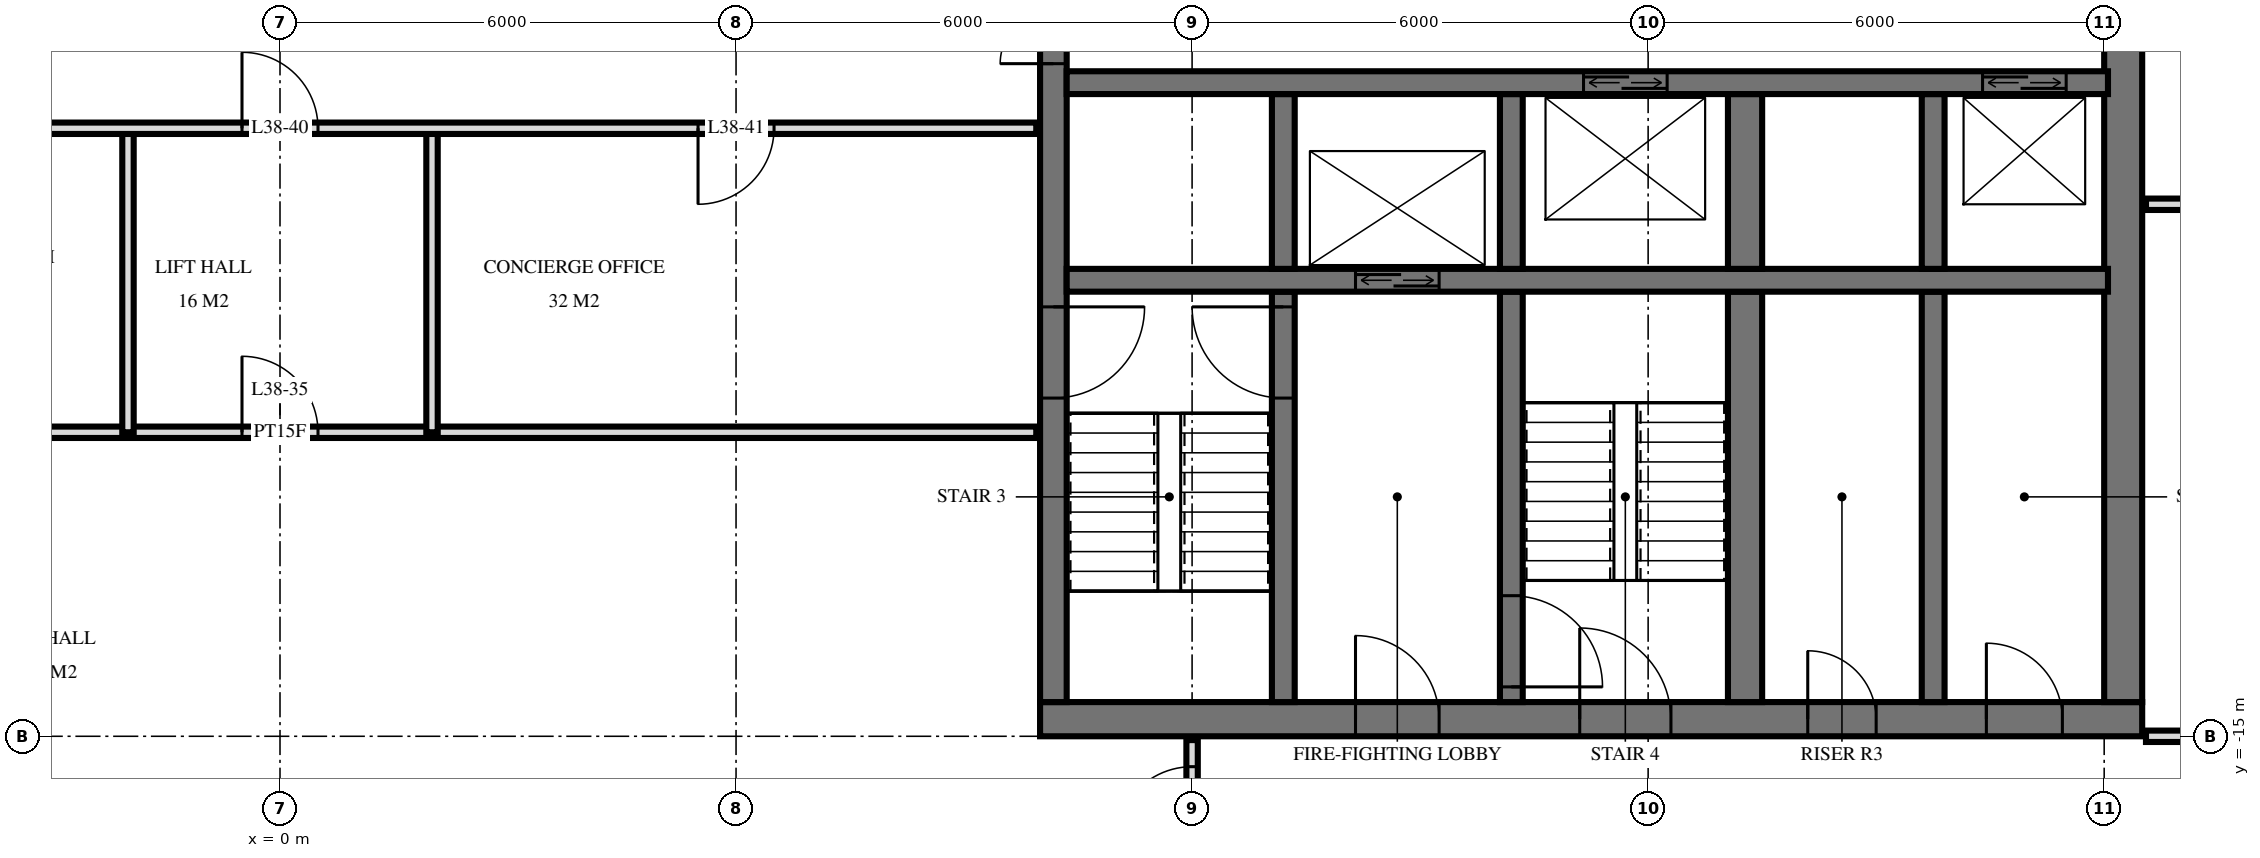
"""IFC4 building model, lengths in metres.
Left out: names, types, materials, properties, quantities, classifications, styles, units other than length and angle.
Written with IfcOpenShell. Run it as: python <this file> out.ifc"""

import sys

from ifc_helpers import new_model, si_unit, direction, frame, frame_2d, origin, place, context, subcontext, project, spatial, rectangle, extrude, element, fill, save


model = new_model("IFC4")
c1 = context("Model", 3, precision=1e-05, world=origin(), true_north=direction((0.0, 1.0)))
c2 = subcontext(c1, "Body", "Model", "MODEL_VIEW")
j1 = project(units=[si_unit("LENGTHUNIT", "METRE"), si_unit("PLANEANGLEUNIT", "RADIAN")], contexts=[c1])
p1 = place(None, origin())
s1 = spatial("IfcSite", under=j1, at=p1, CompositionType="ELEMENT")
p2 = place(p1, origin())
s2 = spatial("IfcBuilding", under=s1, at=p2, CompositionType="ELEMENT")
p3 = place(p2, frame((0.0, 0.0, 148.8)))
s3 = spatial("IfcBuildingStorey", under=s2, at=p3, CompositionType="ELEMENT", Elevation=148.8)
p4 = place(p3, frame((10.0, -14.775, 0.0), z_axis=(0.0, 0.0, 1.0), x_axis=(1.0, 0.0, 0.0)))
e1 = element("IfcWall", 1, at=p4, inside=s3, PredefinedType="SHEAR", context=c2, shape_type="SweptSolid", body=[
    extrude(rectangle(XDim=14.5, YDim=0.45, at=frame_2d((7.25, 0.0))), origin(), (0.0, 0.0, 1.0), 3.6),
])
p5 = place(p4, frame((7.1, 0.0, 0.0)))
e2 = element("IfcOpeningElement", 2, at=p5, cuts=e1, PredefinedType="OPENING", context=c2, shape_type="SweptSolid", body=[
    extrude(rectangle(XDim=1.2, YDim=2.1, at=frame_2d((0.6, 1.05))), frame((0.0, 0.235, 0.0), z_axis=(0.0, -1.0, 0.0), x_axis=(1.0, 0.0, 0.0)), (0.0, 0.0, 1.0), 0.47),
])
p6 = place(p4, frame((4.15, 0.0, 0.0)))
e3 = element("IfcOpeningElement", 3, at=p6, cuts=e1, PredefinedType="OPENING", context=c2, shape_type="SweptSolid", body=[
    extrude(rectangle(XDim=1.1, YDim=2.1, at=frame_2d((0.55, 1.05))), frame((0.0, 0.235, 0.0), z_axis=(0.0, -1.0, 0.0), x_axis=(1.0, 0.0, 0.0)), (0.0, 0.0, 1.0), 0.47),
])
p7 = place(p4, frame((10.1, 0.0, 0.0)))
e4 = element("IfcOpeningElement", 4, at=p7, cuts=e1, PredefinedType="OPENING", context=c2, shape_type="SweptSolid", body=[
    extrude(rectangle(XDim=0.9, YDim=2.1, at=frame_2d((0.45, 1.05))), frame((0.0, 0.235, 0.0), z_axis=(0.0, -1.0, 0.0), x_axis=(1.0, 0.0, 0.0)), (0.0, 0.0, 1.0), 0.47),
])
p8 = place(p4, frame((12.45, 0.0, 0.0)))
e5 = element("IfcOpeningElement", 5, at=p8, cuts=e1, PredefinedType="OPENING", context=c2, shape_type="SweptSolid", body=[
    extrude(rectangle(XDim=1.0, YDim=2.1, at=frame_2d((0.5, 1.05))), frame((0.0, 0.235, 0.0), z_axis=(0.0, -1.0, 0.0), x_axis=(1.0, 0.0, 0.0)), (0.0, 0.0, 1.0), 0.47),
])
p9 = place(p3, frame((10.175, -14.55, 0.0), z_axis=(0.0, 0.0, 1.0), x_axis=(0.0, 1.0, 0.0)))
e6 = element("IfcWall", 6, at=p9, inside=s3, PredefinedType="SHEAR", context=c2, shape_type="SweptSolid", body=[
    extrude(rectangle(XDim=14.1, YDim=0.35, at=frame_2d((7.05, 0.0))), origin(), (0.0, 0.0, 1.0), 3.6),
])
p10 = place(p9, frame((8.4, 0.0, 0.0)))
e7 = element("IfcOpeningElement", 7, at=p10, cuts=e6, PredefinedType="OPENING", context=c2, shape_type="SweptSolid", body=[
    extrude(rectangle(XDim=1.4, YDim=2.4, at=frame_2d((0.7, 1.2))), frame((0.0, 0.185, 0.0), z_axis=(0.0, -1.0, 0.0), x_axis=(1.0, 0.0, 0.0)), (0.0, 0.0, 1.0), 0.37),
])
p11 = place(p9, frame((10.0, 0.0, 0.0)))
e8 = element("IfcOpeningElement", 8, at=p11, cuts=e6, PredefinedType="OPENING", context=c2, shape_type="SweptSolid", body=[
    extrude(rectangle(XDim=1.4, YDim=2.4, at=frame_2d((0.7, 1.2))), frame((0.0, 0.185, 0.0), z_axis=(0.0, -1.0, 0.0), x_axis=(1.0, 0.0, 0.0)), (0.0, 0.0, 1.0), 0.37),
])
p12 = place(p9, frame((4.0, 0.0, 0.0)))
e9 = element("IfcOpeningElement", 9, at=p12, cuts=e6, PredefinedType="OPENING", context=c2, shape_type="SweptSolid", body=[
    extrude(rectangle(XDim=1.2, YDim=2.1, at=frame_2d((0.6, 1.05))), frame((0.0, 0.185, 0.0), z_axis=(0.0, -1.0, 0.0), x_axis=(1.0, 0.0, 0.0)), (0.0, 0.0, 1.0), 0.37),
])
p13 = place(p3, frame((24.25, -14.55, 0.0), z_axis=(0.0, 0.0, 1.0), x_axis=(0.0, 1.0, 0.0)))
e10 = element("IfcWall", 10, at=p13, inside=s3, PredefinedType="SHEAR", context=c2, shape_type="SweptSolid", body=[
    extrude(rectangle(XDim=14.1, YDim=0.5, at=frame_2d((7.05, 0.0))), origin(), (0.0, 0.0, 1.0), 3.6),
])
p14 = place(p3, frame((10.35, -6.4, 0.0), z_axis=(0.0, 0.0, 1.0), x_axis=(1.0, 0.0, 0.0)))
e11 = element("IfcWall", 11, at=p14, inside=s3, PredefinedType="SHEAR", context=c2, shape_type="SweptSolid", body=[
    extrude(rectangle(XDim=13.7, YDim=0.3, at=frame_2d((6.85, 0.0))), origin(), (0.0, 0.0, 1.0), 3.6),
])
p15 = place(p14, frame((12.05, 0.0, 0.0)))
e12 = element("IfcOpeningElement", 12, at=p15, cuts=e11, PredefinedType="OPENING", context=c2, shape_type="SweptSolid", body=[
    extrude(rectangle(XDim=1.1, YDim=2.1, at=frame_2d((0.55, 1.05))), frame((0.0, 0.16, 0.0), z_axis=(0.0, -1.0, 0.0), x_axis=(1.0, 0.0, 0.0)), (0.0, 0.0, 1.0), 0.32),
])
p16 = place(p14, frame((6.8, 0.0, 0.0)))
e13 = element("IfcOpeningElement", 13, at=p16, cuts=e11, PredefinedType="OPENING", context=c2, shape_type="SweptSolid", body=[
    extrude(rectangle(XDim=1.1, YDim=2.1, at=frame_2d((0.55, 1.05))), frame((0.0, 0.16, 0.0), z_axis=(0.0, -1.0, 0.0), x_axis=(1.0, 0.0, 0.0)), (0.0, 0.0, 1.0), 0.32),
])
p17 = place(p3, frame((10.35, -9.0, 0.0), z_axis=(0.0, 0.0, 1.0), x_axis=(1.0, 0.0, 0.0)))
e14 = element("IfcWall", 14, at=p17, inside=s3, PredefinedType="SHEAR", context=c2, shape_type="SweptSolid", body=[
    extrude(rectangle(XDim=13.7, YDim=0.3, at=frame_2d((6.85, 0.0))), origin(), (0.0, 0.0, 1.0), 3.6),
])
p18 = place(p17, frame((3.8, 0.0, 0.0)))
e15 = element("IfcOpeningElement", 15, at=p18, cuts=e14, PredefinedType="OPENING", context=c2, shape_type="SweptSolid", body=[
    extrude(rectangle(XDim=1.1, YDim=2.1, at=frame_2d((0.55, 1.05))), frame((0.0, 0.16, 0.0), z_axis=(0.0, -1.0, 0.0), x_axis=(1.0, 0.0, 0.0)), (0.0, 0.0, 1.0), 0.32),
])
p19 = place(p3, frame((13.2, -8.85, 0.0), z_axis=(0.0, 0.0, 1.0), x_axis=(0.0, 1.0, 0.0)))
e16 = element("IfcWall", 16, at=p19, inside=s3, PredefinedType="SHEAR", context=c2, shape_type="SweptSolid", body=[
    extrude(rectangle(XDim=2.3, YDim=0.3, at=frame_2d((1.15, 0.0))), origin(), (0.0, 0.0, 1.0), 3.6),
])
p20 = place(p3, frame((13.2, -14.55, 0.0), z_axis=(0.0, 0.0, 1.0), x_axis=(0.0, 1.0, 0.0)))
e17 = element("IfcWall", 17, at=p20, inside=s3, PredefinedType="SHEAR", context=c2, shape_type="SweptSolid", body=[
    extrude(rectangle(XDim=5.4, YDim=0.3, at=frame_2d((2.7, 0.0))), origin(), (0.0, 0.0, 1.0), 3.6),
])
p21 = place(p20, frame((4.0, 0.0, 0.0)))
e18 = element("IfcOpeningElement", 18, at=p21, cuts=e17, PredefinedType="OPENING", context=c2, shape_type="SweptSolid", body=[
    extrude(rectangle(XDim=1.2, YDim=2.1, at=frame_2d((0.6, 1.05))), frame((0.0, 0.16, 0.0), z_axis=(0.0, -1.0, 0.0), x_axis=(1.0, 0.0, 0.0)), (0.0, 0.0, 1.0), 0.32),
])
p22 = place(p3, frame((16.2, -8.85, 0.0), z_axis=(0.0, 0.0, 1.0), x_axis=(0.0, 1.0, 0.0)))
e19 = element("IfcWall", 19, at=p22, inside=s3, PredefinedType="SHEAR", context=c2, shape_type="SweptSolid", body=[
    extrude(rectangle(XDim=2.3, YDim=0.3, at=frame_2d((1.15, 0.0))), origin(), (0.0, 0.0, 1.0), 3.6),
])
p23 = place(p3, frame((16.2, -14.55, 0.0), z_axis=(0.0, 0.0, 1.0), x_axis=(0.0, 1.0, 0.0)))
e20 = element("IfcWall", 20, at=p23, inside=s3, PredefinedType="SHEAR", context=c2, shape_type="SweptSolid", body=[
    extrude(rectangle(XDim=5.4, YDim=0.3, at=frame_2d((2.7, 0.0))), origin(), (0.0, 0.0, 1.0), 3.6),
])
p24 = place(p23, frame((0.2, 0.0, 0.0)))
e21 = element("IfcOpeningElement", 21, at=p24, cuts=e20, PredefinedType="OPENING", context=c2, shape_type="SweptSolid", body=[
    extrude(rectangle(XDim=1.2, YDim=2.1, at=frame_2d((0.6, 1.05))), frame((0.0, 0.16, 0.0), z_axis=(0.0, -1.0, 0.0), x_axis=(1.0, 0.0, 0.0)), (0.0, 0.0, 1.0), 0.32),
])
p25 = place(p3, frame((19.275, -8.85, 0.0), z_axis=(0.0, 0.0, 1.0), x_axis=(0.0, 1.0, 0.0)))
e22 = element("IfcWall", 22, at=p25, inside=s3, PredefinedType="SHEAR", context=c2, shape_type="SweptSolid", body=[
    extrude(rectangle(XDim=2.3, YDim=0.45, at=frame_2d((1.15, 0.0))), origin(), (0.0, 0.0, 1.0), 3.6),
])
p26 = place(p3, frame((19.275, -14.55, 0.0), z_axis=(0.0, 0.0, 1.0), x_axis=(0.0, 1.0, 0.0)))
e23 = element("IfcWall", 23, at=p26, inside=s3, PredefinedType="SHEAR", context=c2, shape_type="SweptSolid", body=[
    extrude(rectangle(XDim=5.4, YDim=0.45, at=frame_2d((2.7, 0.0))), origin(), (0.0, 0.0, 1.0), 3.6),
])
p27 = place(p3, frame((21.75, -8.85, 0.0), z_axis=(0.0, 0.0, 1.0), x_axis=(0.0, 1.0, 0.0)))
e24 = element("IfcWall", 24, at=p27, inside=s3, PredefinedType="SHEAR", context=c2, shape_type="SweptSolid", body=[
    extrude(rectangle(XDim=2.3, YDim=0.3, at=frame_2d((1.15, 0.0))), origin(), (0.0, 0.0, 1.0), 3.6),
])
p28 = place(p3, frame((21.75, -14.55, 0.0), z_axis=(0.0, 0.0, 1.0), x_axis=(0.0, 1.0, 0.0)))
e25 = element("IfcWall", 25, at=p28, inside=s3, PredefinedType="SHEAR", context=c2, shape_type="SweptSolid", body=[
    extrude(rectangle(XDim=5.4, YDim=0.3, at=frame_2d((2.7, 0.0))), origin(), (0.0, 0.0, 1.0), 3.6),
])
p29 = place(p3, frame((12.0, -16.8, 0.0), z_axis=(0.0, 0.0, 1.0), x_axis=(0.0, 1.0, 0.0)))
e26 = element("IfcWall", 26, at=p29, inside=s3, PredefinedType="PARTITIONING", context=c2, shape_type="SweptSolid", body=[
    extrude(rectangle(XDim=1.75, YDim=0.15, at=frame_2d((0.875, 0.0))), origin(), (0.0, 0.0, 1.0), 3.32),
])
p30 = place(p29, frame((0.4, 0.0, 0.0)))
e27 = element("IfcOpeningElement", 27, at=p30, cuts=e26, PredefinedType="OPENING", context=c2, shape_type="SweptSolid", body=[
    extrude(rectangle(XDim=1.0, YDim=2.1, at=frame_2d((0.5, 1.05))), frame((0.0, 0.085, 0.0), z_axis=(0.0, -1.0, 0.0), x_axis=(1.0, 0.0, 0.0)), (0.0, 0.0, 1.0), 0.17),
])
for number, where, z_axis, x_axis in (
    (28, (2.0, -11.0, 0.0), (0.0, 0.0, 1.0), (0.0, 1.0, 0.0)),
    (29, (-2.0, -11.0, 0.0), (0.0, 0.0, 1.0), (0.0, 1.0, 0.0)),
):
    element("IfcWall", number, at=place(p3, frame(where, z_axis=z_axis, x_axis=x_axis)), inside=s3, PredefinedType="PARTITIONING", context=c2, shape_type="SweptSolid", body=[
        extrude(rectangle(XDim=4.0, YDim=0.15, at=frame_2d((2.0, 0.0))), origin(), (0.0, 0.0, 1.0), 3.32),
    ])
p31 = place(p3, frame((24.55, -15.0, 0.0), z_axis=(0.0, 0.0, 1.0), x_axis=(1.0, 0.0, 0.0)))
e30 = element("IfcWall", 30, at=p31, inside=s3, PredefinedType="PARTITIONING", context=c2, shape_type="SweptSolid", body=[
    extrude(rectangle(XDim=3.47, YDim=0.15, at=frame_2d((1.735, 0.0))), origin(), (0.0, 0.0, 1.0), 3.32),
])
p32 = place(p31, frame((0.9, 0.0, 0.0)))
e31 = element("IfcOpeningElement", 31, at=p32, cuts=e30, PredefinedType="OPENING", context=c2, shape_type="SweptSolid", body=[
    extrude(rectangle(XDim=1.0, YDim=2.1, at=frame_2d((0.5, 1.05))), frame((0.0, 0.085, 0.0), z_axis=(0.0, -1.0, 0.0), x_axis=(1.0, 0.0, 0.0)), (0.0, 0.0, 1.0), 0.17),
])
p33 = place(p3, frame((-9.95, -11.0, 0.0), z_axis=(0.0, 0.0, 1.0), x_axis=(1.0, 0.0, 0.0)))
e32 = element("IfcWall", 32, at=p33, inside=s3, PredefinedType="PARTITIONING", context=c2, shape_type="SweptSolid", body=[
    extrude(rectangle(XDim=19.9, YDim=0.15, at=frame_2d((9.95, 0.0))), origin(), (0.0, 0.0, 1.0), 3.32),
])
p34 = place(p33, frame((9.45, 0.0, 0.0)))
e33 = element("IfcOpeningElement", 33, at=p34, cuts=e32, PredefinedType="OPENING", context=c2, shape_type="SweptSolid", body=[
    extrude(rectangle(XDim=1.0, YDim=2.1, at=frame_2d((0.5, 1.05))), frame((0.0, 0.085, 0.0), z_axis=(0.0, -1.0, 0.0), x_axis=(1.0, 0.0, 0.0)), (0.0, 0.0, 1.0), 0.17),
])
p35 = place(p33, frame((3.45, 0.0, 0.0)))
e34 = element("IfcOpeningElement", 34, at=p35, cuts=e32, PredefinedType="OPENING", context=c2, shape_type="SweptSolid", body=[
    extrude(rectangle(XDim=1.0, YDim=2.1, at=frame_2d((0.5, 1.05))), frame((0.0, 0.085, 0.0), z_axis=(0.0, -1.0, 0.0), x_axis=(1.0, 0.0, 0.0)), (0.0, 0.0, 1.0), 0.17),
])
p36 = place(p3, frame((24.55, -8.0, 0.0), z_axis=(0.0, 0.0, 1.0), x_axis=(1.0, 0.0, 0.0)))
e35 = element("IfcWall", 35, at=p36, inside=s3, PredefinedType="PARTITIONING", context=c2, shape_type="SweptSolid", body=[
    extrude(rectangle(XDim=3.47, YDim=0.15, at=frame_2d((1.735, 0.0))), origin(), (0.0, 0.0, 1.0), 3.32),
])
p37 = place(p36, frame((1.35, 0.0, 0.0)))
e36 = element("IfcOpeningElement", 36, at=p37, cuts=e35, PredefinedType="OPENING", context=c2, shape_type="SweptSolid", body=[
    extrude(rectangle(XDim=0.9, YDim=2.1, at=frame_2d((0.45, 1.05))), frame((0.0, 0.085, 0.0), z_axis=(0.0, -1.0, 0.0), x_axis=(1.0, 0.0, 0.0)), (0.0, 0.0, 1.0), 0.17),
])
p38 = place(p3, frame((-9.95, -7.0, 0.0), z_axis=(0.0, 0.0, 1.0), x_axis=(1.0, 0.0, 0.0)))
e37 = element("IfcWall", 37, at=p38, inside=s3, PredefinedType="PARTITIONING", context=c2, shape_type="SweptSolid", body=[
    extrude(rectangle(XDim=19.9, YDim=0.15, at=frame_2d((9.95, 0.0))), origin(), (0.0, 0.0, 1.0), 3.32),
])
p39 = place(p38, frame((9.45, 0.0, 0.0)))
e38 = element("IfcOpeningElement", 38, at=p39, cuts=e37, PredefinedType="OPENING", context=c2, shape_type="SweptSolid", body=[
    extrude(rectangle(XDim=1.0, YDim=2.1, at=frame_2d((0.5, 1.05))), frame((0.0, 0.085, 0.0), z_axis=(0.0, -1.0, 0.0), x_axis=(1.0, 0.0, 0.0)), (0.0, 0.0, 1.0), 0.17),
])
p40 = place(p38, frame((15.45, 0.0, 0.0)))
e39 = element("IfcOpeningElement", 39, at=p40, cuts=e37, PredefinedType="OPENING", context=c2, shape_type="SweptSolid", body=[
    extrude(rectangle(XDim=1.0, YDim=2.1, at=frame_2d((0.5, 1.05))), frame((0.0, 0.085, 0.0), z_axis=(0.0, -1.0, 0.0), x_axis=(1.0, 0.0, 0.0)), (0.0, 0.0, 1.0), 0.17),
])
p41 = place(p15, origin())
e40 = element("IfcDoor", 40, at=p41, inside=s3, OperationType="DOUBLE_DOOR_SLIDING", PredefinedType="USERDEFINED", context=c2, shape_type="SweptSolid", body=[
    extrude(rectangle(XDim=1.1, YDim=2.1, at=frame_2d((0.55, 1.05))), frame((0.0, 0.025, 0.0), z_axis=(0.0, -1.0, 0.0), x_axis=(1.0, 0.0, 0.0)), (0.0, 0.0, 1.0), 0.05),
])
fill(e12, e40)
p42 = place(p18, origin())
e41 = element("IfcDoor", 41, at=p42, inside=s3, OperationType="DOUBLE_DOOR_SLIDING", PredefinedType="USERDEFINED", context=c2, shape_type="SweptSolid", body=[
    extrude(rectangle(XDim=1.1, YDim=2.1, at=frame_2d((0.55, 1.05))), frame((0.0, 0.025, 0.0), z_axis=(0.0, -1.0, 0.0), x_axis=(1.0, 0.0, 0.0)), (0.0, 0.0, 1.0), 0.05),
])
fill(e15, e41)
p43 = place(p16, origin())
e42 = element("IfcDoor", 42, at=p43, inside=s3, OperationType="DOUBLE_DOOR_SLIDING", PredefinedType="USERDEFINED", context=c2, shape_type="SweptSolid", body=[
    extrude(rectangle(XDim=1.1, YDim=2.1, at=frame_2d((0.55, 1.05))), frame((0.0, 0.025, 0.0), z_axis=(0.0, -1.0, 0.0), x_axis=(1.0, 0.0, 0.0)), (0.0, 0.0, 1.0), 0.05),
])
fill(e13, e42)
p44 = place(p10, origin())
e43 = element("IfcDoor", 43, at=p44, inside=s3, OperationType="DOUBLE_DOOR_SINGLE_SWING", PredefinedType="DOOR", context=c2, shape_type="SweptSolid", body=[
    extrude(rectangle(XDim=1.4, YDim=2.4, at=frame_2d((0.7, 1.2))), frame((0.0, 0.025, 0.0), z_axis=(0.0, -1.0, 0.0), x_axis=(1.0, 0.0, 0.0)), (0.0, 0.0, 1.0), 0.05),
])
fill(e7, e43)
p45 = place(p12, frame((0.6, 0.0, 0.0), z_axis=(0.0, 0.0, 1.0), x_axis=(-1.0, 0.0, 0.0)))
e44 = element("IfcDoor", 44, at=p45, inside=s3, OperationType="SINGLE_SWING_RIGHT", PredefinedType="DOOR", context=c2, shape_type="SweptSolid", body=[
    extrude(rectangle(XDim=1.2, YDim=2.1, at=frame_2d((0.0, 1.05))), frame((0.0, -0.025, 0.0), z_axis=(0.0, 1.0, 0.0), x_axis=(-1.0, 0.0, 0.0)), (0.0, 0.0, 1.0), 0.05),
])
fill(e9, e44)
p46 = place(p5, origin())
e45 = element("IfcDoor", 45, at=p46, inside=s3, OperationType="SINGLE_SWING_RIGHT", PredefinedType="DOOR", context=c2, shape_type="SweptSolid", body=[
    extrude(rectangle(XDim=1.2, YDim=2.1, at=frame_2d((0.6, 1.05))), frame((0.0, 0.025, 0.0), z_axis=(0.0, -1.0, 0.0), x_axis=(1.0, 0.0, 0.0)), (0.0, 0.0, 1.0), 0.05),
])
fill(e2, e45)
p47 = place(p6, origin())
e46 = element("IfcDoor", 46, at=p47, inside=s3, OperationType="SINGLE_SWING_RIGHT", PredefinedType="DOOR", context=c2, shape_type="SweptSolid", body=[
    extrude(rectangle(XDim=1.1, YDim=2.1, at=frame_2d((0.55, 1.05))), frame((0.0, 0.025, 0.0), z_axis=(0.0, -1.0, 0.0), x_axis=(1.0, 0.0, 0.0)), (0.0, 0.0, 1.0), 0.05),
])
fill(e3, e46)
p48 = place(p7, origin())
e47 = element("IfcDoor", 47, at=p48, inside=s3, OperationType="SINGLE_SWING_RIGHT", PredefinedType="DOOR", context=c2, shape_type="SweptSolid", body=[
    extrude(rectangle(XDim=0.9, YDim=2.1, at=frame_2d((0.45, 1.05))), frame((0.0, 0.025, 0.0), z_axis=(0.0, -1.0, 0.0), x_axis=(1.0, 0.0, 0.0)), (0.0, 0.0, 1.0), 0.05),
])
fill(e4, e47)
p49 = place(p8, origin())
e48 = element("IfcDoor", 48, at=p49, inside=s3, OperationType="SINGLE_SWING_RIGHT", PredefinedType="DOOR", context=c2, shape_type="SweptSolid", body=[
    extrude(rectangle(XDim=1.0, YDim=2.1, at=frame_2d((0.5, 1.05))), frame((0.0, 0.025, 0.0), z_axis=(0.0, -1.0, 0.0), x_axis=(1.0, 0.0, 0.0)), (0.0, 0.0, 1.0), 0.05),
])
fill(e5, e48)
p50 = place(p21, origin())
e49 = element("IfcDoor", 49, at=p50, inside=s3, OperationType="SINGLE_SWING_LEFT", PredefinedType="DOOR", context=c2, shape_type="SweptSolid", body=[
    extrude(rectangle(XDim=1.2, YDim=2.1, at=frame_2d((0.6, 1.05))), frame((0.0, 0.025, 0.0), z_axis=(0.0, -1.0, 0.0), x_axis=(1.0, 0.0, 0.0)), (0.0, 0.0, 1.0), 0.05),
])
fill(e18, e49)
p51 = place(p24, frame((0.6, 0.0, 0.0), z_axis=(0.0, 0.0, 1.0), x_axis=(-1.0, 0.0, 0.0)))
e50 = element("IfcDoor", 50, at=p51, inside=s3, OperationType="SINGLE_SWING_LEFT", PredefinedType="DOOR", context=c2, shape_type="SweptSolid", body=[
    extrude(rectangle(XDim=1.2, YDim=2.1, at=frame_2d((0.0, 1.05))), frame((0.0, -0.025, 0.0), z_axis=(0.0, 1.0, 0.0), x_axis=(-1.0, 0.0, 0.0)), (0.0, 0.0, 1.0), 0.05),
])
fill(e21, e50)
p52 = place(p30, origin())
e51 = element("IfcDoor", 51, at=p52, inside=s3, OperationType="SINGLE_SWING_RIGHT", PredefinedType="DOOR", context=c2, shape_type="SweptSolid", body=[
    extrude(rectangle(XDim=1.0, YDim=2.1, at=frame_2d((0.5, 1.05))), frame((0.0, 0.025, 0.0), z_axis=(0.0, -1.0, 0.0), x_axis=(1.0, 0.0, 0.0)), (0.0, 0.0, 1.0), 0.05),
])
fill(e27, e51)
p53 = place(p34, origin())
e52 = element("IfcDoor", 52, at=p53, inside=s3, OperationType="SINGLE_SWING_RIGHT", PredefinedType="DOOR", context=c2, shape_type="SweptSolid", body=[
    extrude(rectangle(XDim=1.0, YDim=2.1, at=frame_2d((0.5, 1.05))), frame((0.0, 0.025, 0.0), z_axis=(0.0, -1.0, 0.0), x_axis=(1.0, 0.0, 0.0)), (0.0, 0.0, 1.0), 0.05),
])
fill(e33, e52)
p54 = place(p39, origin())
e53 = element("IfcDoor", 53, at=p54, inside=s3, OperationType="SINGLE_SWING_RIGHT", PredefinedType="DOOR", context=c2, shape_type="SweptSolid", body=[
    extrude(rectangle(XDim=1.0, YDim=2.1, at=frame_2d((0.5, 1.05))), frame((0.0, 0.025, 0.0), z_axis=(0.0, -1.0, 0.0), x_axis=(1.0, 0.0, 0.0)), (0.0, 0.0, 1.0), 0.05),
])
fill(e38, e53)
p55 = place(p40, frame((0.5, 0.0, 0.0), z_axis=(0.0, 0.0, 1.0), x_axis=(-1.0, 0.0, 0.0)))
e54 = element("IfcDoor", 54, at=p55, inside=s3, OperationType="SINGLE_SWING_LEFT", PredefinedType="DOOR", context=c2, shape_type="SweptSolid", body=[
    extrude(rectangle(XDim=1.0, YDim=2.1, at=frame_2d((0.0, 1.05))), frame((0.0, -0.025, 0.0), z_axis=(0.0, 1.0, 0.0), x_axis=(-1.0, 0.0, 0.0)), (0.0, 0.0, 1.0), 0.05),
])
fill(e39, e54)
save(model, sys.argv[1])
